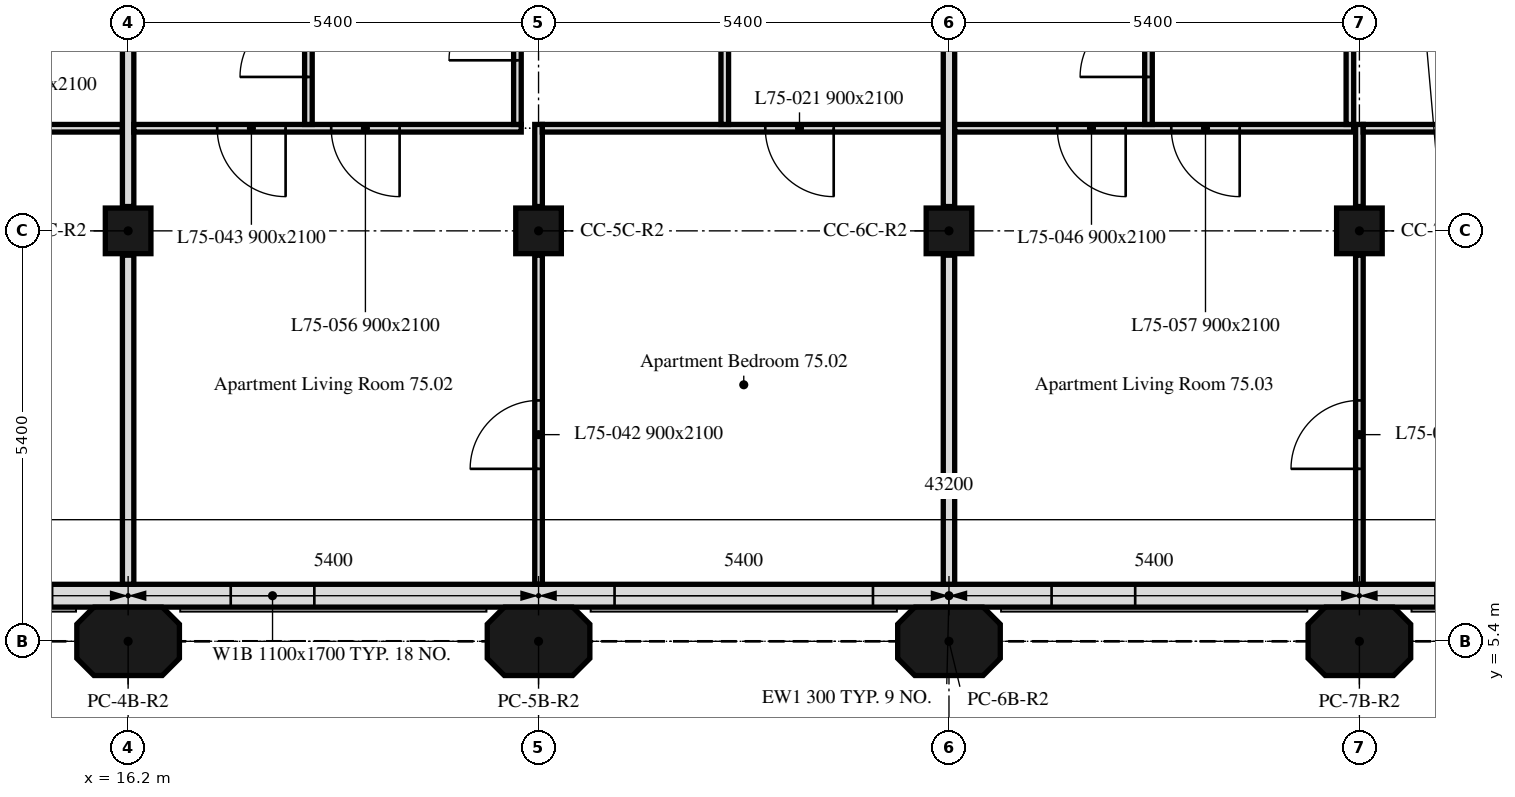
"""IFC4 building model, lengths in metres.
Left out: names, types, materials, properties, quantities, classifications, styles, units other than length and angle.
Written with IfcOpenShell. Run it as: python <this file> out.ifc"""

import sys

from ifc_helpers import new_model, si_unit, direction, frame, frame_2d, origin, origin_2d, place, context, subcontext, project, spatial, polyline, rectangle, outline, extrude, element, fill, save


model = new_model("IFC4")
c1 = context("Model", 3, precision=1e-05, world=origin(), true_north=direction((0.0, 1.0)))
c2 = subcontext(c1, "Body", "Model", "MODEL_VIEW")
j1 = project(units=[si_unit("LENGTHUNIT", "METRE"), si_unit("PLANEANGLEUNIT", "RADIAN")], contexts=[c1])
p1 = place(None, origin())
s1 = spatial("IfcSite", under=j1, at=p1, CompositionType="ELEMENT")
p2 = place(p1, origin())
s2 = spatial("IfcBuilding", under=s1, at=p2, CompositionType="ELEMENT")
p3 = place(p2, frame((0.0, 0.0, 301.6)))
s3 = spatial("IfcBuildingStorey", under=s2, at=p3, CompositionType="ELEMENT", Elevation=301.6)
for number, where, z_axis, x_axis in (
    (1, (16.2, 5.4, 0.0), (0.0, 0.0, 1.0), (1.0, 0.0, 0.0)),
    (2, (21.6, 5.4, 0.0), (0.0, 0.0, 1.0), (1.0, 0.0, 0.0)),
    (3, (27.0, 5.4, 0.0), (0.0, 0.0, 1.0), (1.0, 0.0, 0.0)),
    (4, (32.4, 5.4, 0.0), (0.0, 0.0, 1.0), (1.0, 0.0, 0.0)),
):
    element("IfcColumn", number, at=place(p3, frame(where, z_axis=z_axis, x_axis=x_axis)), inside=s3, PredefinedType="COLUMN", context=c2, shape_type="SweptSolid", body=[
        extrude(outline(polyline([(-0.45, -0.45), (0.45, -0.45), (0.675, -0.225), (0.675, 0.225), (0.45, 0.45), (-0.45, 0.45), (-0.675, 0.225), (-0.675, -0.225), (-0.45, -0.45)])), origin(), (0.0, 0.0, 1.0), 3.0),
    ])
for number, where, z_axis, x_axis in (
    (5, (16.2, 10.8, 0.0), (0.0, 0.0, 1.0), (1.0, 0.0, 0.0)),
    (6, (21.6, 10.8, 0.0), (0.0, 0.0, 1.0), (1.0, 0.0, 0.0)),
    (7, (27.0, 10.8, 0.0), (0.0, 0.0, 1.0), (1.0, 0.0, 0.0)),
    (8, (32.4, 10.8, 0.0), (0.0, 0.0, 1.0), (1.0, 0.0, 0.0)),
):
    element("IfcColumn", number, at=place(p3, frame(where, z_axis=z_axis, x_axis=x_axis)), inside=s3, PredefinedType="COLUMN", context=c2, shape_type="SweptSolid", body=[
        extrude(rectangle(XDim=0.6, YDim=0.6, at=origin_2d()), origin(), (0.0, 0.0, 1.0), 3.0),
    ])
p4 = place(p3, frame((10.986, 6.0, 0.0), z_axis=(0.0, 0.0, 1.0), x_axis=(1.0, 0.0, 0.0)))
e9 = element("IfcWall", 9, at=p4, inside=s3, PredefinedType="SOLIDWALL", context=c2, shape_type="SweptSolid", body=[
    extrude(rectangle(XDim=32.027, YDim=0.3, at=frame_2d((16.014, 0.0))), origin(), (0.0, 0.0, 1.0), 3.0),
])
p5 = place(p4, frame((0.814, 0.0, 0.9)))
e10 = element("IfcOpeningElement", 10, at=p5, cuts=e9, PredefinedType="OPENING", context=c2, shape_type="SweptSolid", body=[
    extrude(rectangle(XDim=3.4, YDim=1.7, at=frame_2d((1.7, 0.85))), frame((0.0, 0.16, 0.0), z_axis=(0.0, -1.0, 0.0), x_axis=(1.0, 0.0, 0.0)), (0.0, 0.0, 1.0), 0.32),
])
p6 = place(p4, frame((6.564, 0.0, 0.9)))
e11 = element("IfcOpeningElement", 11, at=p6, cuts=e9, PredefinedType="OPENING", context=c2, shape_type="SweptSolid", body=[
    extrude(rectangle(XDim=1.1, YDim=1.7, at=frame_2d((0.55, 0.85))), frame((0.0, 0.16, 0.0), z_axis=(0.0, -1.0, 0.0), x_axis=(1.0, 0.0, 0.0)), (0.0, 0.0, 1.0), 0.32),
])
p7 = place(p4, frame((11.614, 0.0, 0.9)))
e12 = element("IfcOpeningElement", 12, at=p7, cuts=e9, PredefinedType="OPENING", context=c2, shape_type="SweptSolid", body=[
    extrude(rectangle(XDim=3.4, YDim=1.7, at=frame_2d((1.7, 0.85))), frame((0.0, 0.16, 0.0), z_axis=(0.0, -1.0, 0.0), x_axis=(1.0, 0.0, 0.0)), (0.0, 0.0, 1.0), 0.32),
])
p8 = place(p4, frame((17.364, 0.0, 0.9)))
e13 = element("IfcOpeningElement", 13, at=p8, cuts=e9, PredefinedType="OPENING", context=c2, shape_type="SweptSolid", body=[
    extrude(rectangle(XDim=1.1, YDim=1.7, at=frame_2d((0.55, 0.85))), frame((0.0, 0.16, 0.0), z_axis=(0.0, -1.0, 0.0), x_axis=(1.0, 0.0, 0.0)), (0.0, 0.0, 1.0), 0.32),
])
p9 = place(p4, frame((22.414, 0.0, 0.9)))
e14 = element("IfcOpeningElement", 14, at=p9, cuts=e9, PredefinedType="OPENING", context=c2, shape_type="SweptSolid", body=[
    extrude(rectangle(XDim=3.4, YDim=1.7, at=frame_2d((1.7, 0.85))), frame((0.0, 0.16, 0.0), z_axis=(0.0, -1.0, 0.0), x_axis=(1.0, 0.0, 0.0)), (0.0, 0.0, 1.0), 0.32),
])
p10 = place(p4, frame((28.164, 0.0, 0.9)))
e15 = element("IfcOpeningElement", 15, at=p10, cuts=e9, PredefinedType="OPENING", context=c2, shape_type="SweptSolid", body=[
    extrude(rectangle(XDim=1.1, YDim=1.7, at=frame_2d((0.55, 0.85))), frame((0.0, 0.16, 0.0), z_axis=(0.0, -1.0, 0.0), x_axis=(1.0, 0.0, 0.0)), (0.0, 0.0, 1.0), 0.32),
])
p11 = place(p3, frame((16.2, 6.151, 0.0), z_axis=(0.0, 0.0, 1.0), x_axis=(0.0, 1.0, 0.0)))
e16 = element("IfcWall", 16, at=p11, inside=s3, PredefinedType="PARTITIONING", context=c2, shape_type="SweptSolid", body=[
    extrude(rectangle(XDim=4.329, YDim=0.15, at=frame_2d((2.165, 0.0))), origin(), (0.0, 0.0, 1.0), 3.0),
])
p12 = place(p3, frame((16.125, 12.15, 0.0), z_axis=(0.0, 0.0, 1.0), x_axis=(-1.0, 0.0, 0.0)))
e17 = element("IfcWall", 17, at=p12, inside=s3, PredefinedType="PARTITIONING", context=c2, shape_type="SweptSolid", body=[
    extrude(rectangle(XDim=5.275, YDim=0.1, at=frame_2d((2.637, 0.0))), origin(), (0.0, 0.0, 1.0), 3.0),
])
p13 = place(p12, frame((1.43, 0.0, 0.0)))
e18 = element("IfcOpeningElement", 18, at=p13, cuts=e17, PredefinedType="OPENING", context=c2, shape_type="SweptSolid", body=[
    extrude(rectangle(XDim=0.9, YDim=2.1, at=frame_2d((0.45, 1.05))), frame((0.0, 0.05, 0.0), z_axis=(0.0, -1.0, 0.0), x_axis=(1.0, 0.0, 0.0)), (0.0, 0.0, 1.0), 0.1),
])
p14 = place(p3, frame((16.2, 11.12, 0.0), z_axis=(0.0, 0.0, 1.0), x_axis=(0.0, 1.0, 0.0)))
e19 = element("IfcWall", 19, at=p14, inside=s3, PredefinedType="PARTITIONING", context=c2, shape_type="SweptSolid", body=[
    extrude(rectangle(XDim=3.205, YDim=0.15, at=frame_2d((1.603, 0.0))), origin(), (0.0, 0.0, 1.0), 3.0),
])
p15 = place(p3, frame((21.6, 6.151, 0.0), z_axis=(0.0, 0.0, 1.0), x_axis=(0.0, 1.0, 0.0)))
e20 = element("IfcWall", 20, at=p15, inside=s3, PredefinedType="PARTITIONING", context=c2, shape_type="SweptSolid", body=[
    extrude(rectangle(XDim=4.329, YDim=0.1, at=frame_2d((2.165, 0.0))), origin(), (0.0, 0.0, 1.0), 3.0),
])
p16 = place(p15, frame((1.518, 0.0, 0.0)))
e21 = element("IfcOpeningElement", 21, at=p16, cuts=e20, PredefinedType="OPENING", context=c2, shape_type="SweptSolid", body=[
    extrude(rectangle(XDim=0.9, YDim=2.1, at=frame_2d((0.45, 1.05))), frame((0.0, 0.05, 0.0), z_axis=(0.0, -1.0, 0.0), x_axis=(1.0, 0.0, 0.0)), (0.0, 0.0, 1.0), 0.1),
])
p17 = place(p3, frame((21.6, 11.12, 0.0), z_axis=(0.0, 0.0, 1.0), x_axis=(0.0, 1.0, 0.0)))
e22 = element("IfcWall", 22, at=p17, inside=s3, PredefinedType="PARTITIONING", context=c2, shape_type="SweptSolid", body=[
    extrude(rectangle(XDim=1.08, YDim=0.1, at=frame_2d((0.54, 0.0))), origin(), (0.0, 0.0, 1.0), 3.0),
])
p18 = place(p3, frame((21.372, 12.15, 0.0), z_axis=(0.0, 0.0, 1.0), x_axis=(-1.0, 0.0, 0.0)))
e23 = element("IfcWall", 23, at=p18, inside=s3, PredefinedType="PARTITIONING", context=c2, shape_type="SweptSolid", body=[
    extrude(rectangle(XDim=5.097, YDim=0.1, at=frame_2d((2.549, 0.0))), origin(), (0.0, 0.0, 1.0), 3.0),
])
p19 = place(p18, frame((3.1, 0.0, 0.0)))
e24 = element("IfcOpeningElement", 24, at=p19, cuts=e23, PredefinedType="OPENING", context=c2, shape_type="SweptSolid", body=[
    extrude(rectangle(XDim=0.9, YDim=2.1, at=frame_2d((0.45, 1.05))), frame((0.0, 0.05, 0.0), z_axis=(0.0, -1.0, 0.0), x_axis=(1.0, 0.0, 0.0)), (0.0, 0.0, 1.0), 0.1),
])
p20 = place(p18, frame((1.6, 0.0, 0.0)))
e25 = element("IfcOpeningElement", 25, at=p20, cuts=e23, PredefinedType="OPENING", context=c2, shape_type="SweptSolid", body=[
    extrude(rectangle(XDim=0.9, YDim=2.1, at=frame_2d((0.45, 1.05))), frame((0.0, 0.05, 0.0), z_axis=(0.0, -1.0, 0.0), x_axis=(1.0, 0.0, 0.0)), (0.0, 0.0, 1.0), 0.1),
])
p21 = place(p3, frame((27.0, 6.151, 0.0), z_axis=(0.0, 0.0, 1.0), x_axis=(0.0, 1.0, 0.0)))
e26 = element("IfcWall", 26, at=p21, inside=s3, PredefinedType="PARTITIONING", context=c2, shape_type="SweptSolid", body=[
    extrude(rectangle(XDim=4.329, YDim=0.15, at=frame_2d((2.165, 0.0))), origin(), (0.0, 0.0, 1.0), 3.0),
])
p22 = place(p3, frame((26.925, 12.15, 0.0), z_axis=(0.0, 0.0, 1.0), x_axis=(-1.0, 0.0, 0.0)))
e27 = element("IfcWall", 27, at=p22, inside=s3, PredefinedType="PARTITIONING", context=c2, shape_type="SweptSolid", body=[
    extrude(rectangle(XDim=5.275, YDim=0.1, at=frame_2d((2.638, 0.0))), origin(), (0.0, 0.0, 1.0), 3.0),
])
p23 = place(p22, frame((1.442, 0.0, 0.0)))
e28 = element("IfcOpeningElement", 28, at=p23, cuts=e27, PredefinedType="OPENING", context=c2, shape_type="SweptSolid", body=[
    extrude(rectangle(XDim=0.9, YDim=2.1, at=frame_2d((0.45, 1.05))), frame((0.0, 0.05, 0.0), z_axis=(0.0, -1.0, 0.0), x_axis=(1.0, 0.0, 0.0)), (0.0, 0.0, 1.0), 0.1),
])
p24 = place(p3, frame((18.572, 12.2, 0.0), z_axis=(0.0, 0.0, 1.0), x_axis=(0.0, 1.0, 0.0)))
e29 = element("IfcWall", 29, at=p24, inside=s3, PredefinedType="PARTITIONING", context=c2, shape_type="SweptSolid", body=[
    extrude(rectangle(XDim=2.125, YDim=0.1, at=frame_2d((1.062, 0.0))), origin(), (0.0, 0.0, 1.0), 3.0),
])
p25 = place(p24, frame((0.625, 0.0, 0.0)))
e30 = element("IfcOpeningElement", 30, at=p25, cuts=e29, PredefinedType="OPENING", context=c2, shape_type="SweptSolid", body=[
    extrude(rectangle(XDim=0.9, YDim=2.1, at=frame_2d((0.45, 1.05))), frame((0.0, 0.05, 0.0), z_axis=(0.0, -1.0, 0.0), x_axis=(1.0, 0.0, 0.0)), (0.0, 0.0, 1.0), 0.1),
])
p26 = place(p3, frame((21.322, 12.2, 0.0), z_axis=(0.0, 0.0, 1.0), x_axis=(0.0, 1.0, 0.0)))
e31 = element("IfcWall", 31, at=p26, inside=s3, PredefinedType="PARTITIONING", context=c2, shape_type="SweptSolid", body=[
    extrude(rectangle(XDim=2.125, YDim=0.1, at=frame_2d((1.062, 0.0))), origin(), (0.0, 0.0, 1.0), 3.0),
])
p27 = place(p26, frame((0.844, 0.0, 0.0)))
e32 = element("IfcOpeningElement", 32, at=p27, cuts=e31, PredefinedType="OPENING", context=c2, shape_type="SweptSolid", body=[
    extrude(rectangle(XDim=0.9, YDim=2.1, at=frame_2d((0.45, 1.05))), frame((0.0, 0.05, 0.0), z_axis=(0.0, -1.0, 0.0), x_axis=(1.0, 0.0, 0.0)), (0.0, 0.0, 1.0), 0.1),
])
p28 = place(p3, frame((24.05, 12.2, 0.0), z_axis=(0.0, 0.0, 1.0), x_axis=(0.0, 1.0, 0.0)))
e33 = element("IfcWall", 33, at=p28, inside=s3, PredefinedType="PARTITIONING", context=c2, shape_type="SweptSolid", body=[
    extrude(rectangle(XDim=2.125, YDim=0.1, at=frame_2d((1.062, 0.0))), origin(), (0.0, 0.0, 1.0), 3.0),
])
p29 = place(p3, frame((27.0, 11.12, 0.0), z_axis=(0.0, 0.0, 1.0), x_axis=(0.0, 1.0, 0.0)))
e34 = element("IfcWall", 34, at=p29, inside=s3, PredefinedType="PARTITIONING", context=c2, shape_type="SweptSolid", body=[
    extrude(rectangle(XDim=3.205, YDim=0.15, at=frame_2d((1.603, 0.0))), origin(), (0.0, 0.0, 1.0), 3.0),
])
p30 = place(p3, frame((32.4, 6.151, 0.0), z_axis=(0.0, 0.0, 1.0), x_axis=(0.0, 1.0, 0.0)))
e35 = element("IfcWall", 35, at=p30, inside=s3, PredefinedType="PARTITIONING", context=c2, shape_type="SweptSolid", body=[
    extrude(rectangle(XDim=4.329, YDim=0.1, at=frame_2d((2.165, 0.0))), origin(), (0.0, 0.0, 1.0), 3.0),
])
p31 = place(p30, frame((1.518, 0.0, 0.0)))
e36 = element("IfcOpeningElement", 36, at=p31, cuts=e35, PredefinedType="OPENING", context=c2, shape_type="SweptSolid", body=[
    extrude(rectangle(XDim=0.9, YDim=2.1, at=frame_2d((0.45, 1.05))), frame((0.0, 0.05, 0.0), z_axis=(0.0, -1.0, 0.0), x_axis=(1.0, 0.0, 0.0)), (0.0, 0.0, 1.0), 0.1),
])
p32 = place(p3, frame((32.4, 11.12, 0.0), z_axis=(0.0, 0.0, 1.0), x_axis=(0.0, 1.0, 0.0)))
e37 = element("IfcWall", 37, at=p32, inside=s3, PredefinedType="PARTITIONING", context=c2, shape_type="SweptSolid", body=[
    extrude(rectangle(XDim=1.08, YDim=0.1, at=frame_2d((0.54, 0.0))), origin(), (0.0, 0.0, 1.0), 3.0),
])
p33 = place(p3, frame((32.325, 12.15, 0.0), z_axis=(0.0, 0.0, 1.0), x_axis=(-1.0, 0.0, 0.0)))
e38 = element("IfcWall", 38, at=p33, inside=s3, PredefinedType="PARTITIONING", context=c2, shape_type="SweptSolid", body=[
    extrude(rectangle(XDim=5.25, YDim=0.1, at=frame_2d((2.625, 0.0))), origin(), (0.0, 0.0, 1.0), 3.0),
])
p34 = place(p33, frame((3.0, 0.0, 0.0)))
e39 = element("IfcOpeningElement", 39, at=p34, cuts=e38, PredefinedType="OPENING", context=c2, shape_type="SweptSolid", body=[
    extrude(rectangle(XDim=0.9, YDim=2.1, at=frame_2d((0.45, 1.05))), frame((0.0, 0.05, 0.0), z_axis=(0.0, -1.0, 0.0), x_axis=(1.0, 0.0, 0.0)), (0.0, 0.0, 1.0), 0.1),
])
p35 = place(p33, frame((1.5, 0.0, 0.0)))
e40 = element("IfcOpeningElement", 40, at=p35, cuts=e38, PredefinedType="OPENING", context=c2, shape_type="SweptSolid", body=[
    extrude(rectangle(XDim=0.9, YDim=2.1, at=frame_2d((0.45, 1.05))), frame((0.0, 0.05, 0.0), z_axis=(0.0, -1.0, 0.0), x_axis=(1.0, 0.0, 0.0)), (0.0, 0.0, 1.0), 0.1),
])
p36 = place(p3, frame((37.725, 12.15, 0.0), z_axis=(0.0, 0.0, 1.0), x_axis=(-1.0, 0.0, 0.0)))
e41 = element("IfcWall", 41, at=p36, inside=s3, PredefinedType="PARTITIONING", context=c2, shape_type="SweptSolid", body=[
    extrude(rectangle(XDim=5.275, YDim=0.1, at=frame_2d((2.638, 0.0))), origin(), (0.0, 0.0, 1.0), 3.0),
])
p37 = place(p36, frame((2.155, 0.0, 0.0)))
e42 = element("IfcOpeningElement", 42, at=p37, cuts=e41, PredefinedType="OPENING", context=c2, shape_type="SweptSolid", body=[
    extrude(rectangle(XDim=0.9, YDim=2.1, at=frame_2d((0.45, 1.05))), frame((0.0, 0.05, 0.0), z_axis=(0.0, -1.0, 0.0), x_axis=(1.0, 0.0, 0.0)), (0.0, 0.0, 1.0), 0.1),
])
p38 = place(p3, frame((29.625, 12.2, 0.0), z_axis=(0.0, 0.0, 1.0), x_axis=(0.0, 1.0, 0.0)))
e43 = element("IfcWall", 43, at=p38, inside=s3, PredefinedType="PARTITIONING", context=c2, shape_type="SweptSolid", body=[
    extrude(rectangle(XDim=2.125, YDim=0.1, at=frame_2d((1.062, 0.0))), origin(), (0.0, 0.0, 1.0), 3.0),
])
p39 = place(p38, frame((0.625, 0.0, 0.0)))
e44 = element("IfcOpeningElement", 44, at=p39, cuts=e43, PredefinedType="OPENING", context=c2, shape_type="SweptSolid", body=[
    extrude(rectangle(XDim=0.9, YDim=2.1, at=frame_2d((0.45, 1.05))), frame((0.0, 0.05, 0.0), z_axis=(0.0, -1.0, 0.0), x_axis=(1.0, 0.0, 0.0)), (0.0, 0.0, 1.0), 0.1),
])
p40 = place(p3, frame((32.275, 12.2, 0.0), z_axis=(0.0, 0.0, 1.0), x_axis=(0.0, 1.0, 0.0)))
e45 = element("IfcWall", 45, at=p40, inside=s3, PredefinedType="PARTITIONING", context=c2, shape_type="SweptSolid", body=[
    extrude(rectangle(XDim=2.125, YDim=0.1, at=frame_2d((1.062, 0.0))), origin(), (0.0, 0.0, 1.0), 3.0),
])
p41 = place(p40, frame((0.975, 0.0, 0.0)))
e46 = element("IfcOpeningElement", 46, at=p41, cuts=e45, PredefinedType="OPENING", context=c2, shape_type="SweptSolid", body=[
    extrude(rectangle(XDim=0.9, YDim=2.1, at=frame_2d((0.45, 1.05))), frame((0.0, 0.05, 0.0), z_axis=(0.0, -1.0, 0.0), x_axis=(1.0, 0.0, 0.0)), (0.0, 0.0, 1.0), 0.1),
])
p42 = place(p6, origin())
e47 = element("IfcWindow", 47, at=p42, inside=s3, PartitioningType="SINGLE_PANEL", PredefinedType="WINDOW", context=c2, shape_type="SweptSolid", body=[
    extrude(rectangle(XDim=1.1, YDim=1.7, at=frame_2d((0.55, 0.85))), frame((0.0, 0.03, 0.0), z_axis=(0.0, -1.0, 0.0), x_axis=(1.0, 0.0, 0.0)), (0.0, 0.0, 1.0), 0.06),
])
fill(e11, e47)
p43 = place(p7, origin())
e48 = element("IfcWindow", 48, at=p43, inside=s3, PartitioningType="SINGLE_PANEL", PredefinedType="WINDOW", context=c2, shape_type="SweptSolid", body=[
    extrude(rectangle(XDim=3.4, YDim=1.7, at=frame_2d((1.7, 0.85))), frame((0.0, 0.03, 0.0), z_axis=(0.0, -1.0, 0.0), x_axis=(1.0, 0.0, 0.0)), (0.0, 0.0, 1.0), 0.06),
])
fill(e12, e48)
p44 = place(p8, origin())
e49 = element("IfcWindow", 49, at=p44, inside=s3, PartitioningType="SINGLE_PANEL", PredefinedType="WINDOW", context=c2, shape_type="SweptSolid", body=[
    extrude(rectangle(XDim=1.1, YDim=1.7, at=frame_2d((0.55, 0.85))), frame((0.0, 0.03, 0.0), z_axis=(0.0, -1.0, 0.0), x_axis=(1.0, 0.0, 0.0)), (0.0, 0.0, 1.0), 0.06),
])
fill(e13, e49)
p45 = place(p23, origin())
e50 = element("IfcDoor", 50, at=p45, inside=s3, OperationType="SINGLE_SWING_RIGHT", PredefinedType="DOOR", context=c2, shape_type="SweptSolid", body=[
    extrude(rectangle(XDim=0.9, YDim=2.1, at=frame_2d((0.45, 1.05))), frame((0.0, 0.025, 0.0), z_axis=(0.0, -1.0, 0.0), x_axis=(1.0, 0.0, 0.0)), (0.0, 0.0, 1.0), 0.05),
])
fill(e28, e50)
p46 = place(p27, origin())
e51 = element("IfcDoor", 51, at=p46, inside=s3, OperationType="SINGLE_SWING_LEFT", PredefinedType="DOOR", context=c2, shape_type="SweptSolid", body=[
    extrude(rectangle(XDim=0.9, YDim=2.1, at=frame_2d((0.45, 1.05))), frame((0.0, 0.025, 0.0), z_axis=(0.0, -1.0, 0.0), x_axis=(1.0, 0.0, 0.0)), (0.0, 0.0, 1.0), 0.05),
])
fill(e32, e51)
p47 = place(p16, origin())
e52 = element("IfcDoor", 52, at=p47, inside=s3, OperationType="SINGLE_SWING_LEFT", PredefinedType="DOOR", context=c2, shape_type="SweptSolid", body=[
    extrude(rectangle(XDim=0.9, YDim=2.1, at=frame_2d((0.45, 1.05))), frame((0.0, 0.025, 0.0), z_axis=(0.0, -1.0, 0.0), x_axis=(1.0, 0.0, 0.0)), (0.0, 0.0, 1.0), 0.05),
])
fill(e21, e52)
p48 = place(p19, origin())
e53 = element("IfcDoor", 53, at=p48, inside=s3, OperationType="SINGLE_SWING_LEFT", PredefinedType="DOOR", context=c2, shape_type="SweptSolid", body=[
    extrude(rectangle(XDim=0.9, YDim=2.1, at=frame_2d((0.45, 1.05))), frame((0.0, 0.025, 0.0), z_axis=(0.0, -1.0, 0.0), x_axis=(1.0, 0.0, 0.0)), (0.0, 0.0, 1.0), 0.05),
])
fill(e24, e53)
p49 = place(p25, origin())
e54 = element("IfcDoor", 54, at=p49, inside=s3, OperationType="SINGLE_SWING_LEFT", PredefinedType="DOOR", context=c2, shape_type="SweptSolid", body=[
    extrude(rectangle(XDim=0.9, YDim=2.1, at=frame_2d((0.45, 1.05))), frame((0.0, 0.025, 0.0), z_axis=(0.0, -1.0, 0.0), x_axis=(1.0, 0.0, 0.0)), (0.0, 0.0, 1.0), 0.05),
])
fill(e30, e54)
p50 = place(p31, origin())
e55 = element("IfcDoor", 55, at=p50, inside=s3, OperationType="SINGLE_SWING_RIGHT", PredefinedType="DOOR", context=c2, shape_type="SweptSolid", body=[
    extrude(rectangle(XDim=0.9, YDim=2.1, at=frame_2d((0.45, 1.05))), frame((0.0, 0.025, 0.0), z_axis=(0.0, -1.0, 0.0), x_axis=(1.0, 0.0, 0.0)), (0.0, 0.0, 1.0), 0.05),
])
fill(e36, e55)
p51 = place(p34, origin())
e56 = element("IfcDoor", 56, at=p51, inside=s3, OperationType="SINGLE_SWING_LEFT", PredefinedType="DOOR", context=c2, shape_type="SweptSolid", body=[
    extrude(rectangle(XDim=0.9, YDim=2.1, at=frame_2d((0.45, 1.05))), frame((0.0, 0.025, 0.0), z_axis=(0.0, -1.0, 0.0), x_axis=(1.0, 0.0, 0.0)), (0.0, 0.0, 1.0), 0.05),
])
fill(e39, e56)
p52 = place(p39, origin())
e57 = element("IfcDoor", 57, at=p52, inside=s3, OperationType="SINGLE_SWING_RIGHT", PredefinedType="DOOR", context=c2, shape_type="SweptSolid", body=[
    extrude(rectangle(XDim=0.9, YDim=2.1, at=frame_2d((0.45, 1.05))), frame((0.0, 0.025, 0.0), z_axis=(0.0, -1.0, 0.0), x_axis=(1.0, 0.0, 0.0)), (0.0, 0.0, 1.0), 0.05),
])
fill(e44, e57)
p53 = place(p20, origin())
e58 = element("IfcDoor", 58, at=p53, inside=s3, OperationType="SINGLE_SWING_RIGHT", PredefinedType="DOOR", context=c2, shape_type="SweptSolid", body=[
    extrude(rectangle(XDim=0.9, YDim=2.1, at=frame_2d((0.45, 1.05))), frame((0.0, 0.025, 0.0), z_axis=(0.0, -1.0, 0.0), x_axis=(1.0, 0.0, 0.0)), (0.0, 0.0, 1.0), 0.05),
])
fill(e25, e58)
p54 = place(p35, origin())
e59 = element("IfcDoor", 59, at=p54, inside=s3, OperationType="SINGLE_SWING_RIGHT", PredefinedType="DOOR", context=c2, shape_type="SweptSolid", body=[
    extrude(rectangle(XDim=0.9, YDim=2.1, at=frame_2d((0.45, 1.05))), frame((0.0, 0.025, 0.0), z_axis=(0.0, -1.0, 0.0), x_axis=(1.0, 0.0, 0.0)), (0.0, 0.0, 1.0), 0.05),
])
fill(e40, e59)
save(model, sys.argv[1])
